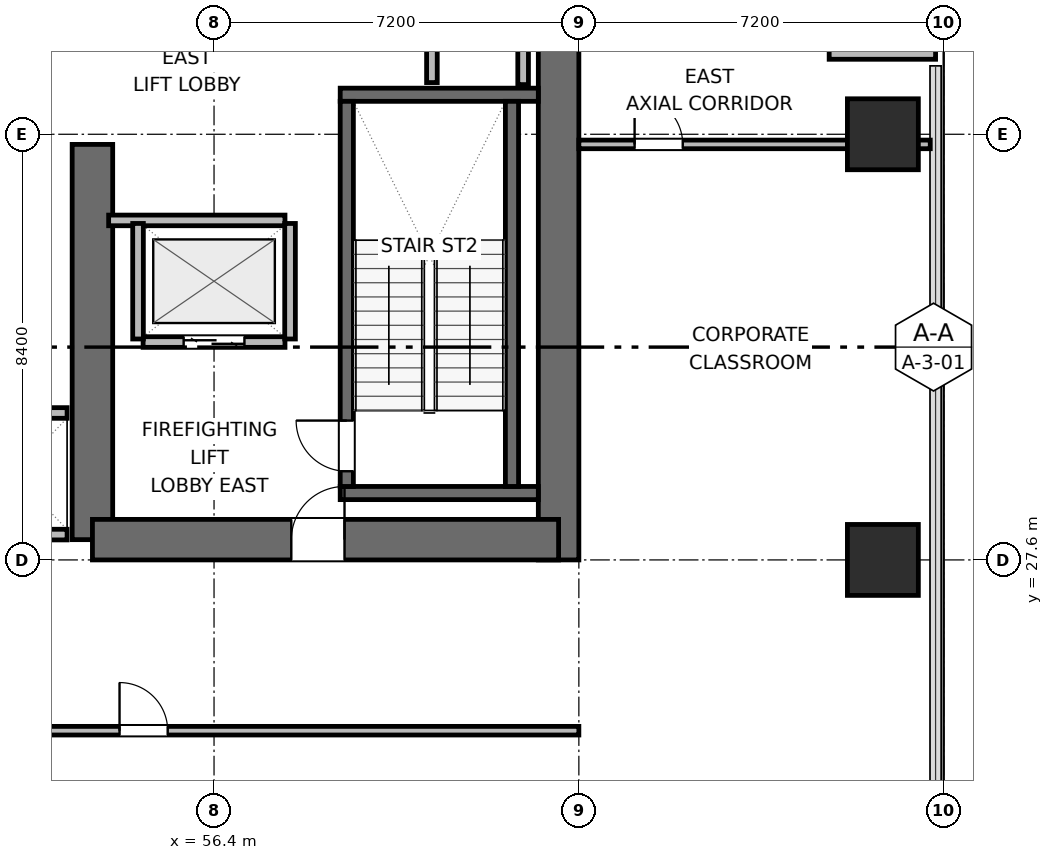
"""IFC4 building model, lengths in metres.
Left out: names, types, materials, properties, quantities, classifications, styles, units other than length and angle.
Written with IfcOpenShell. Run it as: python <this file> out.ifc"""

import sys

from ifc_helpers import new_model, si_unit, direction, frame, frame_2d, origin, origin_2d, place, context, subcontext, project, spatial, rectangle, extrude, element, fill, save


model = new_model("IFC4")
c1 = context("Model", 3, precision=1e-05, world=origin(), true_north=direction((0.0, 1.0)))
c2 = subcontext(c1, "Body", "Model", "MODEL_VIEW")
j1 = project(units=[si_unit("LENGTHUNIT", "METRE"), si_unit("PLANEANGLEUNIT", "RADIAN")], contexts=[c1])
p1 = place(None, origin())
s1 = spatial("IfcSite", under=j1, at=p1, CompositionType="ELEMENT")
p2 = place(p1, origin())
s2 = spatial("IfcBuilding", under=s1, at=p2, CompositionType="ELEMENT")
p3 = place(p2, frame((0.0, 0.0, 120.9)))
s3 = spatial("IfcBuildingStorey", under=s2, at=p3, CompositionType="ELEMENT", Elevation=120.9)
p4 = place(p3, frame((54.0, 28.0, 0.0), z_axis=(0.0, 0.0, 1.0), x_axis=(0.0, 1.0, 0.0)))
e1 = element("IfcWall", 1, at=p4, inside=s3, PredefinedType="SHEAR", context=c2, shape_type="SweptSolid", body=[
    extrude(rectangle(XDim=7.8, YDim=0.8, at=frame_2d((3.9, 0.0))), origin(), (0.0, 0.0, 1.0), 4.5),
])
p5 = place(p3, frame((63.2, 27.6, 0.0), z_axis=(0.0, 0.0, 1.0), x_axis=(0.0, 1.0, 0.0)))
e2 = element("IfcWall", 2, at=p5, inside=s3, PredefinedType="SHEAR", context=c2, shape_type="SweptSolid", body=[
    extrude(rectangle(XDim=16.8, YDim=0.8, at=frame_2d((8.4, 0.0))), origin(), (0.0, 0.0, 1.0), 4.5),
])
p6 = place(p3, frame((54.0, 28.0, 0.0), z_axis=(0.0, 0.0, 1.0), x_axis=(1.0, 0.0, 0.0)))
e3 = element("IfcWall", 3, at=p6, inside=s3, PredefinedType="SHEAR", context=c2, shape_type="SweptSolid", body=[
    extrude(rectangle(XDim=9.2, YDim=0.8, at=frame_2d((4.6, 0.0))), origin(), (0.0, 0.0, 1.0), 4.5),
])
p7 = place(p6, frame((3.925, 0.0, 0.0)))
e4 = element("IfcOpeningElement", 4, at=p7, cuts=e3, PredefinedType="OPENING", context=c2, shape_type="SweptSolid", body=[
    extrude(rectangle(XDim=1.05, YDim=2.04, at=frame_2d((0.525, 1.02))), frame((0.0, 0.41, 0.0), z_axis=(0.0, -1.0, 0.0), x_axis=(1.0, 0.0, 0.0)), (0.0, 0.0, 1.0), 0.82),
])
for number, where, z_axis, x_axis in (
    (5, (58.89, 28.92, 0.0), (0.0, 0.0, 1.0), (1.0, 0.0, 0.0)),
    (6, (58.89, 36.78, 0.0), (0.0, 0.0, 1.0), (1.0, 0.0, 0.0)),
):
    element("IfcWall", number, at=place(p3, frame(where, z_axis=z_axis, x_axis=x_axis)), inside=s3, PredefinedType="SHEAR", context=c2, shape_type="SweptSolid", body=[
        extrude(rectangle(XDim=3.91, YDim=0.26, at=frame_2d((1.955, 0.0))), origin(), (0.0, 0.0, 1.0), 4.5),
    ])
p8 = place(p3, frame((59.02, 29.05, 0.0), z_axis=(0.0, 0.0, 1.0), x_axis=(0.0, 1.0, 0.0)))
e7 = element("IfcWall", 7, at=p8, inside=s3, PredefinedType="SHEAR", context=c2, shape_type="SweptSolid", body=[
    extrude(rectangle(XDim=7.6, YDim=0.26, at=frame_2d((3.8, 0.0))), origin(), (0.0, 0.0, 1.0), 4.5),
])
p9 = place(p8, frame((0.3, 0.0, 0.0)))
e8 = element("IfcOpeningElement", 8, at=p9, cuts=e7, PredefinedType="OPENING", context=c2, shape_type="SweptSolid", body=[
    extrude(rectangle(XDim=1.0, YDim=2.04, at=frame_2d((0.5, 1.02))), frame((0.0, 0.14, 0.0), z_axis=(0.0, -1.0, 0.0), x_axis=(1.0, 0.0, 0.0)), (0.0, 0.0, 1.0), 0.28),
])
p10 = place(p3, frame((62.28, 29.05, 0.0), z_axis=(0.0, 0.0, 1.0), x_axis=(0.0, 1.0, 0.0)))
e9 = element("IfcWall", 9, at=p10, inside=s3, PredefinedType="SHEAR", context=c2, shape_type="SweptSolid", body=[
    extrude(rectangle(XDim=7.6, YDim=0.26, at=frame_2d((3.8, 0.0))), origin(), (0.0, 0.0, 1.0), 4.5),
])
for number, where, z_axis, x_axis in (
    (10, (69.6, 27.6, 0.0), (0.0, 0.0, 1.0), (1.0, 0.0, 0.0)),
    (11, (69.6, 36.0, 0.0), (0.0, 0.0, 1.0), (1.0, 0.0, 0.0)),
):
    element("IfcColumn", number, at=place(p3, frame(where, z_axis=z_axis, x_axis=x_axis)), inside=s3, PredefinedType="COLUMN", context=c2, shape_type="SweptSolid", body=[
        extrude(rectangle(XDim=1.4, YDim=1.4, at=origin_2d()), origin(), (0.0, 0.0, 1.0), 4.5),
    ])
p11 = place(p3, frame((68.54, 37.64, 0.0), z_axis=(0.0, 0.0, 1.0), x_axis=(1.0, 0.0, 0.0)))
e12 = element("IfcWall", 12, at=p11, inside=s3, PredefinedType="SOLIDWALL", context=c2, shape_type="SweptSolid", body=[
    extrude(rectangle(XDim=2.1, YDim=0.32, at=frame_2d((1.05, 0.0))), origin(), (0.0, 0.0, 1.0), 3.475),
])
p12 = place(p3, frame((60.7, 37.02, 0.0), z_axis=(0.0, 0.0, 1.0), x_axis=(0.0, 1.0, 0.0)))
e13 = element("IfcWall", 13, at=p12, inside=s3, PredefinedType="PARTITIONING", context=c2, shape_type="SweptSolid", body=[
    extrude(rectangle(XDim=1.96, YDim=0.21, at=frame_2d((0.98, 0.0))), origin(), (0.0, 0.0, 1.0), 4.24),
])
p13 = place(p3, frame((62.5, 36.98, 0.0), z_axis=(0.0, 0.0, 1.0), x_axis=(0.0, 1.0, 0.0)))
e14 = element("IfcWall", 14, at=p13, inside=s3, PredefinedType="PARTITIONING", context=c2, shape_type="SweptSolid", body=[
    extrude(rectangle(XDim=2.04, YDim=0.21, at=frame_2d((1.02, 0.0))), origin(), (0.0, 0.0, 1.0), 4.24),
])
p14 = place(p3, frame((55.0, 31.9, 0.0), z_axis=(0.0, 0.0, 1.0), x_axis=(1.0, 0.0, 0.0)))
e15 = element("IfcWall", 15, at=p14, inside=s3, PredefinedType="PARTITIONING", context=c2, shape_type="SweptSolid", body=[
    extrude(rectangle(XDim=2.8, YDim=0.21, at=frame_2d((1.4, 0.0))), origin(), (0.0, 0.0, 1.0), 4.24),
])
p15 = place(p14, frame((0.8, 0.0, 0.0)))
e16 = element("IfcOpeningElement", 16, at=p15, cuts=e15, PredefinedType="OPENING", context=c2, shape_type="SweptSolid", body=[
    extrude(rectangle(XDim=1.2, YDim=2.04, at=frame_2d((0.6, 1.02))), frame((0.0, 0.115, 0.0), z_axis=(0.0, -1.0, 0.0), x_axis=(1.0, 0.0, 0.0)), (0.0, 0.0, 1.0), 0.23),
])
p16 = place(p3, frame((54.32, 34.3, 0.0), z_axis=(0.0, 0.0, 1.0), x_axis=(1.0, 0.0, 0.0)))
e17 = element("IfcWall", 17, at=p16, inside=s3, PredefinedType="PARTITIONING", context=c2, shape_type="SweptSolid", body=[
    extrude(rectangle(XDim=3.48, YDim=0.21, at=frame_2d((1.74, 0.0))), origin(), (0.0, 0.0, 1.0), 4.24),
])
for number, where, z_axis, x_axis in (
    (18, (54.9, 31.96, 0.0), (0.0, 0.0, 1.0), (0.0, 1.0, 0.0)),
    (19, (57.9, 31.96, 0.0), (0.0, 0.0, 1.0), (0.0, 1.0, 0.0)),
):
    element("IfcWall", number, at=place(p3, frame(where, z_axis=z_axis, x_axis=x_axis)), inside=s3, PredefinedType="PARTITIONING", context=c2, shape_type="SweptSolid", body=[
        extrude(rectangle(XDim=2.28, YDim=0.21, at=frame_2d((1.14, 0.0))), origin(), (0.0, 0.0, 1.0), 4.24),
    ])
p17 = place(p3, frame((51.4, 30.5, 0.0), z_axis=(0.0, 0.0, 1.0), x_axis=(1.0, 0.0, 0.0)))
e20 = element("IfcWall", 20, at=p17, inside=s3, PredefinedType="PARTITIONING", context=c2, shape_type="SweptSolid", body=[
    extrude(rectangle(XDim=2.1, YDim=0.21, at=frame_2d((1.05, 0.0))), origin(), (0.0, 0.0, 1.0), 4.24),
])
p18 = place(p3, frame((51.4, 28.1, 0.0), z_axis=(0.0, 0.0, 1.0), x_axis=(1.0, 0.0, 0.0)))
e21 = element("IfcWall", 21, at=p18, inside=s3, PredefinedType="PARTITIONING", context=c2, shape_type="SweptSolid", body=[
    extrude(rectangle(XDim=2.1, YDim=0.21, at=frame_2d((1.05, 0.0))), origin(), (0.0, 0.0, 1.0), 3.125),
])
p19 = place(p3, frame((29.25, 24.23, 0.0), z_axis=(0.0, 0.0, 1.0), x_axis=(1.0, 0.0, 0.0)))
e22 = element("IfcWall", 22, at=p19, inside=s3, PredefinedType="PARTITIONING", context=c2, shape_type="SweptSolid", body=[
    extrude(rectangle(XDim=34.35, YDim=0.17, at=frame_2d((17.175, 0.0))), origin(), (0.0, 0.0, 1.0), 4.24),
])
p20 = place(p19, frame((8.11, 0.0, 0.0)))
e23 = element("IfcOpeningElement", 23, at=p20, cuts=e22, PredefinedType="OPENING", context=c2, shape_type="SweptSolid", body=[
    extrude(rectangle(XDim=0.95, YDim=2.04, at=frame_2d((0.475, 1.02))), frame((0.0, 0.095, 0.0), z_axis=(0.0, -1.0, 0.0), x_axis=(1.0, 0.0, 0.0)), (0.0, 0.0, 1.0), 0.19),
])
p21 = place(p19, frame((25.285, 0.0, 0.0)))
e24 = element("IfcOpeningElement", 24, at=p21, cuts=e22, PredefinedType="OPENING", context=c2, shape_type="SweptSolid", body=[
    extrude(rectangle(XDim=0.95, YDim=2.04, at=frame_2d((0.475, 1.02))), frame((0.0, 0.095, 0.0), z_axis=(0.0, -1.0, 0.0), x_axis=(1.0, 0.0, 0.0)), (0.0, 0.0, 1.0), 0.19),
])
p22 = place(p3, frame((63.6, 35.8, 0.0), z_axis=(0.0, 0.0, 1.0), x_axis=(1.0, 0.0, 0.0)))
e25 = element("IfcWall", 25, at=p22, inside=s3, PredefinedType="PARTITIONING", context=c2, shape_type="SweptSolid", body=[
    extrude(rectangle(XDim=6.935, YDim=0.17, at=frame_2d((3.467, 0.0))), origin(), (0.0, 0.0, 1.0), 3.603),
])
p23 = place(p22, frame((1.1, 0.0, 0.0)))
e26 = element("IfcOpeningElement", 26, at=p23, cuts=e25, PredefinedType="OPENING", context=c2, shape_type="SweptSolid", body=[
    extrude(rectangle(XDim=0.95, YDim=2.04, at=frame_2d((0.475, 1.02))), frame((0.0, 0.095, 0.0), z_axis=(0.0, -1.0, 0.0), x_axis=(1.0, 0.0, 0.0)), (0.0, 0.0, 1.0), 0.19),
])
p24 = place(p9, origin())
e27 = element("IfcDoor", 27, at=p24, inside=s3, OperationType="SINGLE_SWING_RIGHT", PredefinedType="DOOR", context=c2, shape_type="SweptSolid", body=[
    extrude(rectangle(XDim=1.0, YDim=2.04, at=frame_2d((0.5, 1.02))), frame((0.0, 0.025, 0.0), z_axis=(0.0, -1.0, 0.0), x_axis=(1.0, 0.0, 0.0)), (0.0, 0.0, 1.0), 0.05),
])
fill(e8, e27)
p25 = place(p15, origin())
e28 = element("IfcDoor", 28, at=p25, inside=s3, OperationType="DOUBLE_DOOR_SLIDING", PredefinedType="DOOR", context=c2, shape_type="SweptSolid", body=[
    extrude(rectangle(XDim=1.2, YDim=2.04, at=frame_2d((0.6, 1.02))), frame((0.0, 0.025, 0.0), z_axis=(0.0, -1.0, 0.0), x_axis=(1.0, 0.0, 0.0)), (0.0, 0.0, 1.0), 0.05),
])
fill(e16, e28)
p26 = place(p7, origin())
e29 = element("IfcDoor", 29, at=p26, inside=s3, OperationType="SINGLE_SWING_RIGHT", PredefinedType="DOOR", context=c2, shape_type="SweptSolid", body=[
    extrude(rectangle(XDim=1.05, YDim=2.04, at=frame_2d((0.525, 1.02))), frame((0.0, 0.025, 0.0), z_axis=(0.0, -1.0, 0.0), x_axis=(1.0, 0.0, 0.0)), (0.0, 0.0, 1.0), 0.05),
])
fill(e4, e29)
p27 = place(p21, origin())
e30 = element("IfcDoor", 30, at=p27, inside=s3, OperationType="SINGLE_SWING_LEFT", PredefinedType="DOOR", context=c2, shape_type="SweptSolid", body=[
    extrude(rectangle(XDim=0.95, YDim=2.04, at=frame_2d((0.475, 1.02))), frame((0.0, 0.025, 0.0), z_axis=(0.0, -1.0, 0.0), x_axis=(1.0, 0.0, 0.0)), (0.0, 0.0, 1.0), 0.05),
])
fill(e24, e30)
p28 = place(p23, origin())
e31 = element("IfcDoor", 31, at=p28, inside=s3, OperationType="SINGLE_SWING_LEFT", PredefinedType="DOOR", context=c2, shape_type="SweptSolid", body=[
    extrude(rectangle(XDim=0.95, YDim=2.04, at=frame_2d((0.475, 1.02))), frame((0.0, 0.025, 0.0), z_axis=(0.0, -1.0, 0.0), x_axis=(1.0, 0.0, 0.0)), (0.0, 0.0, 1.0), 0.05),
])
fill(e26, e31)
save(model, sys.argv[1])
